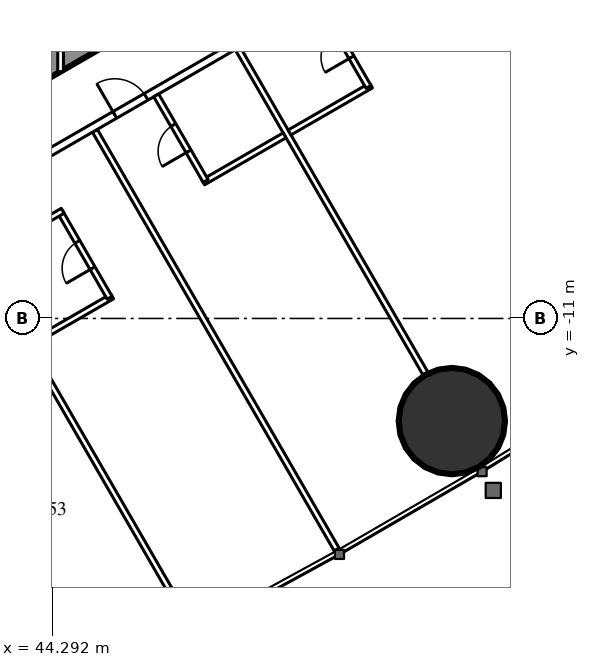
"""IFC4 building model, lengths in metres.
Left out: names, types, materials, properties, quantities, classifications, styles, units other than length and angle.
Written with IfcOpenShell. Run it as: python <this file> out.ifc"""

import sys

from ifc_helpers import new_model, si_unit, direction, frame, frame_2d, origin, origin_2d, place, context, subcontext, project, spatial, rectangle, hollow_circle, extrude, element, fill, save


model = new_model("IFC4")
c1 = context("Model", 3, precision=1e-05, world=origin(), true_north=direction((0.0, 1.0)))
c2 = subcontext(c1, "Body", "Model", "MODEL_VIEW")
j1 = project(units=[si_unit("LENGTHUNIT", "METRE"), si_unit("PLANEANGLEUNIT", "RADIAN")], contexts=[c1])
p1 = place(None, origin())
s1 = spatial("IfcSite", under=j1, at=p1, CompositionType="ELEMENT")
p2 = place(p1, origin())
s2 = spatial("IfcBuilding", under=s1, at=p2, CompositionType="ELEMENT")
p3 = place(p2, frame((0.0, 0.0, 28.5)))
s3 = spatial("IfcBuildingStorey", under=s2, at=p3, CompositionType="ELEMENT", Elevation=28.5)
p4 = place(p3, frame((54.795, -13.701, 0.0), z_axis=(0.0, 0.0, 1.0), x_axis=(1.0, 0.0, 0.0)))
e1 = element("IfcColumn", 1, at=p4, inside=s3, PredefinedType="COLUMN", context=c2, shape_type="SweptSolid", body=[
    extrude(hollow_circle(Radius=1.4, WallThickness=0.12, at=origin_2d()), origin(), (0.0, 0.0, 1.0), 3.5),
])
p5 = place(p3, frame((27.2, -13.8, 0.0), z_axis=(0.0, 0.0, 1.0), x_axis=(0.866027159892, 0.499996958321, 0.0)))
e2 = element("IfcWall", 2, at=p5, inside=s3, PredefinedType="SHEAR", context=c2, shape_type="SweptSolid", body=[
    extrude(rectangle(XDim=27.947, YDim=1.2, at=frame_2d((13.973, 0.0))), origin(), (0.0, 0.0, 1.0), 3.5),
])
p6 = place(p5, frame((4.6, 0.0, 0.0)))
e3 = element("IfcOpeningElement", 3, at=p6, cuts=e2, PredefinedType="OPENING", context=c2, shape_type="SweptSolid", body=[
    extrude(rectangle(XDim=1.0, YDim=2.2, at=frame_2d((0.5, 1.1))), frame((0.0, 0.61, 0.0), z_axis=(0.0, -1.0, 0.0), x_axis=(1.0, 0.0, 0.0)), (0.0, 0.0, 1.0), 1.22),
])
p7 = place(p5, frame((13.395, 0.0, 0.0)))
e4 = element("IfcOpeningElement", 4, at=p7, cuts=e2, PredefinedType="OPENING", context=c2, shape_type="SweptSolid", body=[
    extrude(rectangle(XDim=1.8, YDim=2.2, at=frame_2d((0.9, 1.1))), frame((0.0, 0.61, 0.0), z_axis=(0.0, -1.0, 0.0), x_axis=(1.0, 0.0, 0.0)), (0.0, 0.0, 1.0), 1.22),
])
p8 = place(p3, frame((41.647, -8.23, 0.0), z_axis=(0.0, 0.0, 1.0), x_axis=(0.49998590462, -0.866033541603, 0.0)))
e5 = element("IfcWall", 5, at=p8, inside=s3, PredefinedType="PARTITIONING", context=c2, shape_type="SweptSolid", body=[
    extrude(rectangle(XDim=12.621, YDim=0.15, at=frame_2d((6.311, 0.0))), origin(), (0.0, 0.0, 1.0), 3.25),
])
p9 = place(p3, frame((45.403, -6.062, 0.0), z_axis=(0.0, 0.0, 1.0), x_axis=(0.500007077968, -0.866021317279, 0.0)))
e6 = element("IfcWall", 6, at=p9, inside=s3, PredefinedType="PARTITIONING", context=c2, shape_type="SweptSolid", body=[
    extrude(rectangle(XDim=12.721, YDim=0.15, at=frame_2d((6.361, 0.0))), origin(), (0.0, 0.0, 1.0), 3.25),
])
p10 = place(p3, frame((49.159, -3.893, 0.0), z_axis=(0.0, 0.0, 1.0), x_axis=(0.499998773722, -0.866026111775, 0.0)))
e7 = element("IfcWall", 7, at=p10, inside=s3, PredefinedType="PARTITIONING", context=c2, shape_type="SweptSolid", body=[
    extrude(rectangle(XDim=9.892, YDim=0.15, at=frame_2d((4.946, 0.0))), origin(), (0.0, 0.0, 1.0), 2.25),
])
p11 = place(p3, frame((37.96, -10.243, 0.0), z_axis=(0.0, 0.0, 1.0), x_axis=(0.866026429433, 0.499998223521, 0.0)))
e8 = element("IfcWall", 8, at=p11, inside=s3, PredefinedType="PARTITIONING", context=c2, shape_type="SweptSolid", body=[
    extrude(rectangle(XDim=20.487, YDim=0.2, at=frame_2d((10.243, 0.0))), origin(), (0.0, 0.0, 1.0), 3.25),
])
p12 = place(p11, frame((4.575, 0.0, 0.0)))
e9 = element("IfcOpeningElement", 9, at=p12, cuts=e8, PredefinedType="OPENING", context=c2, shape_type="SweptSolid", body=[
    extrude(rectangle(XDim=0.95, YDim=2.2, at=frame_2d((0.475, 1.1))), frame((0.0, 0.11, 0.0), z_axis=(0.0, -1.0, 0.0), x_axis=(1.0, 0.0, 0.0)), (0.0, 0.0, 1.0), 0.22),
])
p13 = place(p11, frame((9.199, 0.0, 0.0)))
e10 = element("IfcOpeningElement", 10, at=p13, cuts=e8, PredefinedType="OPENING", context=c2, shape_type="SweptSolid", body=[
    extrude(rectangle(XDim=0.95, YDim=2.2, at=frame_2d((0.475, 1.1))), frame((0.0, 0.11, 0.0), z_axis=(0.0, -1.0, 0.0), x_axis=(1.0, 0.0, 0.0)), (0.0, 0.0, 1.0), 0.22),
])
p14 = place(p11, frame((15.599, 0.0, 0.0)))
e11 = element("IfcOpeningElement", 11, at=p14, cuts=e8, PredefinedType="OPENING", context=c2, shape_type="SweptSolid", body=[
    extrude(rectangle(XDim=0.95, YDim=2.2, at=frame_2d((0.475, 1.1))), frame((0.0, 0.11, 0.0), z_axis=(0.0, -1.0, 0.0), x_axis=(1.0, 0.0, 0.0)), (0.0, 0.0, 1.0), 0.22),
])
p15 = place(p11, frame((2.875, 0.0, 0.0)))
e12 = element("IfcOpeningElement", 12, at=p15, cuts=e8, PredefinedType="OPENING", context=c2, shape_type="SweptSolid", body=[
    extrude(rectangle(XDim=0.95, YDim=2.2, at=frame_2d((0.475, 1.1))), frame((0.0, 0.11, 0.0), z_axis=(0.0, -1.0, 0.0), x_axis=(1.0, 0.0, 0.0)), (0.0, 0.0, 1.0), 0.22),
])
p16 = place(p3, frame((43.712, -11.657, 0.0), z_axis=(0.0, 0.0, 1.0), x_axis=(0.866006523861, 0.500032699561, 0.0)))
e13 = element("IfcWall", 13, at=p16, inside=s3, PredefinedType="PARTITIONING", context=c2, shape_type="SweptSolid", body=[
    extrude(rectangle(XDim=2.475, YDim=0.15, at=frame_2d((1.237, 0.0))), origin(), (0.0, 0.0, 1.0), 3.25),
])
p17 = place(p3, frame((44.491, -8.205, 0.0), z_axis=(0.0, 0.0, 1.0), x_axis=(0.500047596559, -0.865997922154, 0.0)))
e14 = element("IfcWall", 14, at=p17, inside=s3, PredefinedType="PARTITIONING", context=c2, shape_type="SweptSolid", body=[
    extrude(rectangle(XDim=2.6, YDim=0.15, at=frame_2d((1.3, 0.0))), origin(), (0.0, 0.0, 1.0), 3.25),
])
p18 = place(p17, frame((0.9, 0.0, 0.0)))
e15 = element("IfcOpeningElement", 15, at=p18, cuts=e14, PredefinedType="OPENING", context=c2, shape_type="SweptSolid", body=[
    extrude(rectangle(XDim=0.8, YDim=2.2, at=frame_2d((0.4, 1.1))), frame((0.0, 0.085, 0.0), z_axis=(0.0, -1.0, 0.0), x_axis=(1.0, 0.0, 0.0)), (0.0, 0.0, 1.0), 0.17),
])
for number, where, z_axis, x_axis in (
    (16, (42.412, -9.405, 0.0), (0.0, 0.0, 1.0), (0.866, 0.5, 0.0)),
    (17, (48.251, -7.42, 0.0), (0.0, 0.0, 1.0), (0.866, 0.5, 0.0)),
):
    element("IfcWall", number, at=place(p3, frame(where, z_axis=z_axis, x_axis=x_axis)), inside=s3, PredefinedType="PARTITIONING", context=c2, shape_type="SweptSolid", body=[
        extrude(rectangle(XDim=2.475, YDim=0.15, at=frame_2d((1.237, 0.0))), origin(), (0.0, 0.0, 1.0), 3.25),
    ])
p19 = place(p3, frame((47.016, -5.13, 0.0), z_axis=(0.0, 0.0, 1.0), x_axis=(0.500006934395, -0.866021400173, 0.0)))
e18 = element("IfcWall", 18, at=p19, inside=s3, PredefinedType="PARTITIONING", context=c2, shape_type="SweptSolid", body=[
    extrude(rectangle(XDim=2.6, YDim=0.15, at=frame_2d((1.3, 0.0))), origin(), (0.0, 0.0, 1.0), 3.25),
])
p20 = place(p19, frame((0.9, 0.0, 0.0)))
e19 = element("IfcOpeningElement", 19, at=p20, cuts=e18, PredefinedType="OPENING", context=c2, shape_type="SweptSolid", body=[
    extrude(rectangle(XDim=0.8, YDim=2.2, at=frame_2d((0.4, 1.1))), frame((0.0, 0.085, 0.0), z_axis=(0.0, -1.0, 0.0), x_axis=(1.0, 0.0, 0.0)), (0.0, 0.0, 1.0), 0.17),
])
p21 = place(p3, frame((50.524, -6.107, 0.0), z_axis=(0.0, 0.0, 1.0), x_axis=(0.866031185235, 0.4999899861, 0.0)))
e20 = element("IfcWall", 20, at=p21, inside=s3, PredefinedType="PARTITIONING", context=c2, shape_type="SweptSolid", body=[
    extrude(rectangle(XDim=2.475, YDim=0.15, at=frame_2d((1.238, 0.0))), origin(), (0.0, 0.0, 1.0), 3.25),
])
p22 = place(p3, frame((51.303, -2.656, 0.0), z_axis=(0.0, 0.0, 1.0), x_axis=(0.500047596559, -0.865997922154, 0.0)))
e21 = element("IfcWall", 21, at=p22, inside=s3, PredefinedType="PARTITIONING", context=c2, shape_type="SweptSolid", body=[
    extrude(rectangle(XDim=2.6, YDim=0.15, at=frame_2d((1.3, 0.0))), origin(), (0.0, 0.0, 1.0), 3.25),
])
p23 = place(p22, frame((0.9, 0.0, 0.0)))
e22 = element("IfcOpeningElement", 22, at=p23, cuts=e21, PredefinedType="OPENING", context=c2, shape_type="SweptSolid", body=[
    extrude(rectangle(XDim=0.8, YDim=2.2, at=frame_2d((0.4, 1.1))), frame((0.0, 0.085, 0.0), z_axis=(0.0, -1.0, 0.0), x_axis=(1.0, 0.0, 0.0)), (0.0, 0.0, 1.0), 0.17),
])
p24 = place(p3, frame((44.5, -4.505, 0.0), z_axis=(0.0, 0.0, 1.0), x_axis=(0.0, 1.0, 0.0)))
e23 = element("IfcWall", 23, at=p24, inside=s3, PredefinedType="PARTITIONING", context=c2, shape_type="SweptSolid", body=[
    extrude(rectangle(XDim=9.009, YDim=0.15, at=frame_2d((4.505, 0.0))), origin(), (0.0, 0.0, 1.0), 2.45),
])
p25 = place(p24, frame((1.752, 0.0, 0.0)))
e24 = element("IfcOpeningElement", 24, at=p25, cuts=e23, PredefinedType="OPENING", context=c2, shape_type="SweptSolid", body=[
    extrude(rectangle(XDim=1.0, YDim=2.2, at=frame_2d((0.5, 1.1))), frame((0.0, 0.085, 0.0), z_axis=(0.0, -1.0, 0.0), x_axis=(1.0, 0.0, 0.0)), (0.0, 0.0, 1.0), 0.17),
])
p26 = place(p24, frame((6.257, 0.0, 0.0)))
e25 = element("IfcOpeningElement", 25, at=p26, cuts=e23, PredefinedType="OPENING", context=c2, shape_type="SweptSolid", body=[
    extrude(rectangle(XDim=1.0, YDim=2.2, at=frame_2d((0.5, 1.1))), frame((0.0, 0.085, 0.0), z_axis=(0.0, -1.0, 0.0), x_axis=(1.0, 0.0, 0.0)), (0.0, 0.0, 1.0), 0.17),
])
p27 = place(p18, origin())
e26 = element("IfcDoor", 26, at=p27, inside=s3, OperationType="SINGLE_SWING_RIGHT", PredefinedType="DOOR", context=c2, shape_type="SweptSolid", body=[
    extrude(rectangle(XDim=0.8, YDim=2.2, at=frame_2d((0.4, 1.1))), frame((0.0, 0.025, 0.0), z_axis=(0.0, -1.0, 0.0), x_axis=(1.0, 0.0, 0.0)), (0.0, 0.0, 1.0), 0.05),
])
fill(e15, e26)
p28 = place(p20, origin())
e27 = element("IfcDoor", 27, at=p28, inside=s3, OperationType="SINGLE_SWING_RIGHT", PredefinedType="DOOR", context=c2, shape_type="SweptSolid", body=[
    extrude(rectangle(XDim=0.8, YDim=2.2, at=frame_2d((0.4, 1.1))), frame((0.0, 0.025, 0.0), z_axis=(0.0, -1.0, 0.0), x_axis=(1.0, 0.0, 0.0)), (0.0, 0.0, 1.0), 0.05),
])
fill(e19, e27)
p29 = place(p13, origin())
e28 = element("IfcDoor", 28, at=p29, inside=s3, OperationType="SINGLE_SWING_LEFT", PredefinedType="DOOR", context=c2, shape_type="SweptSolid", body=[
    extrude(rectangle(XDim=0.95, YDim=2.2, at=frame_2d((0.475, 1.1))), frame((0.0, 0.025, 0.0), z_axis=(0.0, -1.0, 0.0), x_axis=(1.0, 0.0, 0.0)), (0.0, 0.0, 1.0), 0.05),
])
fill(e10, e28)
p30 = place(p23, origin())
e29 = element("IfcDoor", 29, at=p30, inside=s3, OperationType="SINGLE_SWING_RIGHT", PredefinedType="DOOR", context=c2, shape_type="SweptSolid", body=[
    extrude(rectangle(XDim=0.8, YDim=2.2, at=frame_2d((0.4, 1.1))), frame((0.0, 0.025, 0.0), z_axis=(0.0, -1.0, 0.0), x_axis=(1.0, 0.0, 0.0)), (0.0, 0.0, 1.0), 0.05),
])
fill(e22, e29)
save(model, sys.argv[1])
